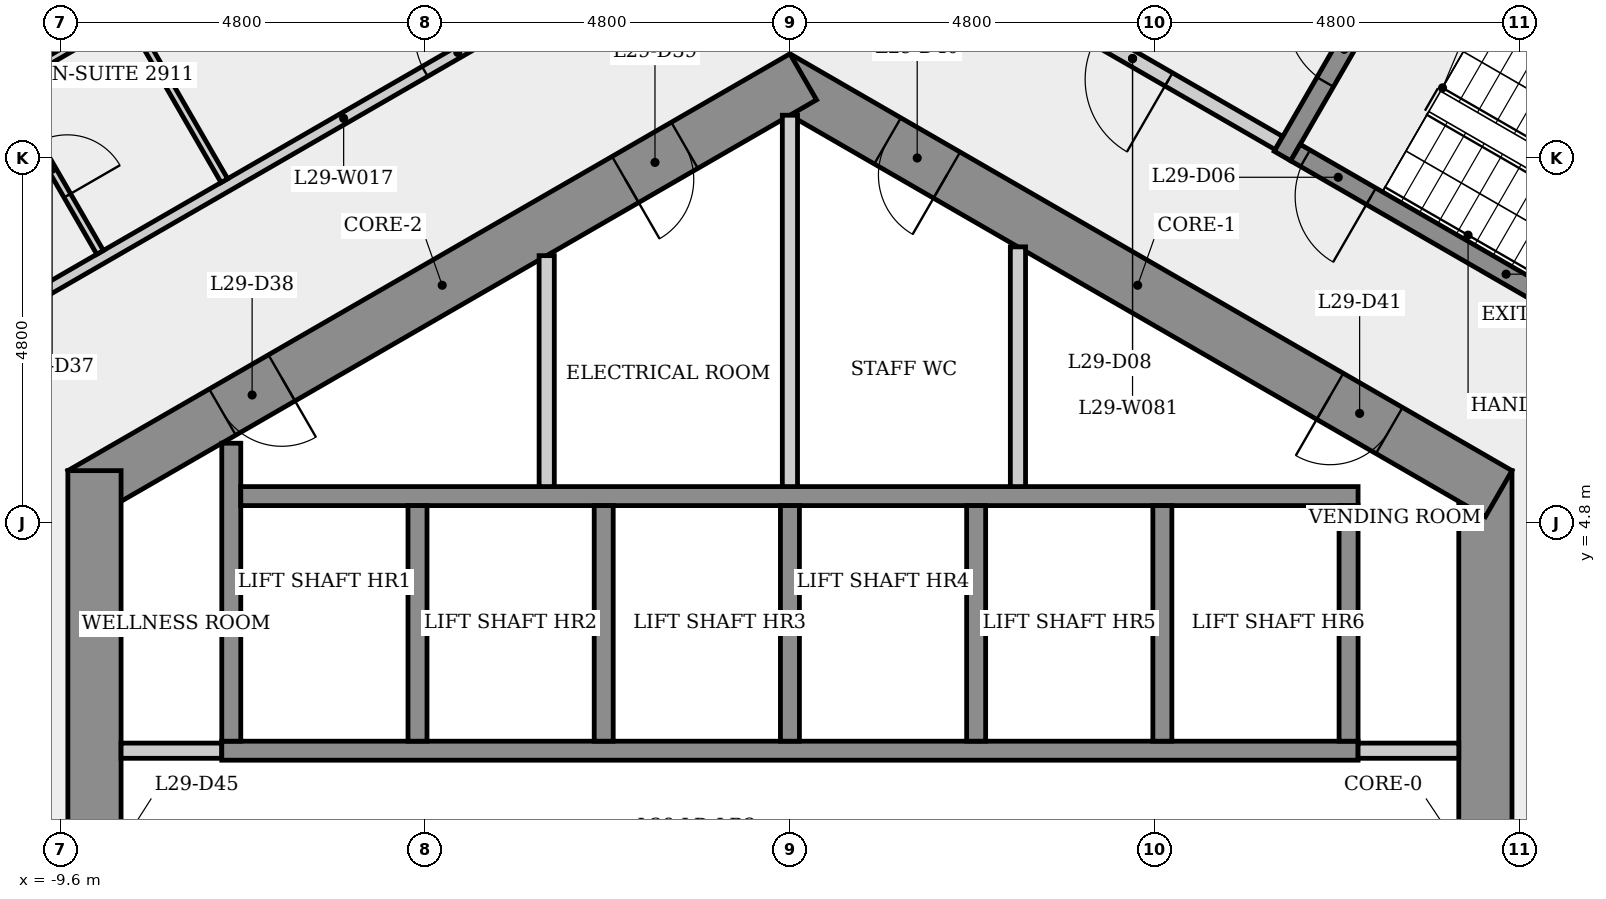
"""IFC4 building model, lengths in metres.
Left out: names, types, materials, properties, quantities, classifications, styles, units other than length and angle.
Written with IfcOpenShell. Run it as: python <this file> out.ifc"""

import sys

from ifc_helpers import new_model, si_unit, direction, frame, frame_2d, origin, place, context, subcontext, project, spatial, rectangle, extrude, element, fill, save


model = new_model("IFC4")
c1 = context("Model", 3, precision=1e-05, world=origin(), true_north=direction((0.0, 1.0)))
c2 = subcontext(c1, "Body", "Model", "MODEL_VIEW")
j1 = project(units=[si_unit("LENGTHUNIT", "METRE"), si_unit("PLANEANGLEUNIT", "RADIAN")], contexts=[c1])
p1 = place(None, origin())
s1 = spatial("IfcSite", under=j1, at=p1, CompositionType="ELEMENT")
p2 = place(p1, origin())
s2 = spatial("IfcBuilding", under=s1, at=p2, CompositionType="ELEMENT")
p3 = place(p2, frame((0.0, 0.0, 110.3)))
s3 = spatial("IfcBuildingStorey", under=s2, at=p3, CompositionType="ELEMENT", Elevation=110.3)
p4 = place(p3, frame((9.15, -5.485, 0.0), z_axis=(0.0, 0.0, 1.0), x_axis=(0.0, 1.0, 0.0)))
e1 = element("IfcWall", 1, at=p4, inside=s3, PredefinedType="SHEAR", context=c2, shape_type="SweptSolid", body=[
    extrude(rectangle(XDim=10.97, YDim=0.7, at=frame_2d((5.485, 0.0))), origin(), (0.0, 0.0, 1.0), 3.4),
])
p5 = place(p4, frame((4.685, 0.0, 0.0)))
e2 = element("IfcOpeningElement", 2, at=p5, cuts=e1, PredefinedType="OPENING", context=c2, shape_type="SweptSolid", body=[
    extrude(rectangle(XDim=1.6, YDim=2.1, at=frame_2d((0.8, 1.05))), frame((0.0, 0.36, 0.0), z_axis=(0.0, -1.0, 0.0), x_axis=(1.0, 0.0, 0.0)), (0.0, 0.0, 1.0), 0.72),
])
p6 = place(p3, frame((9.325, 5.182, 0.0), z_axis=(0.0, 0.0, 1.0), x_axis=(-0.866023993627, 0.500002442456, 0.0)))
e3 = element("IfcWall", 3, at=p6, inside=s3, PredefinedType="SHEAR", context=c2, shape_type="SweptSolid", body=[
    extrude(rectangle(XDim=10.97, YDim=0.7, at=frame_2d((5.485, 0.0))), origin(), (0.0, 0.0, 1.0), 3.4),
])
p7 = place(p6, frame((8.384, 0.0, 0.0)))
e4 = element("IfcOpeningElement", 4, at=p7, cuts=e3, PredefinedType="OPENING", context=c2, shape_type="SweptSolid", body=[
    extrude(rectangle(XDim=0.9, YDim=2.1, at=frame_2d((0.45, 1.05))), frame((0.0, 0.36, 0.0), z_axis=(0.0, -1.0, 0.0), x_axis=(1.0, 0.0, 0.0)), (0.0, 0.0, 1.0), 0.72),
])
p8 = place(p6, frame((1.663, 0.0, 0.0)))
e5 = element("IfcOpeningElement", 5, at=p8, cuts=e3, PredefinedType="OPENING", context=c2, shape_type="SweptSolid", body=[
    extrude(rectangle(XDim=0.9, YDim=2.1, at=frame_2d((0.45, 1.05))), frame((0.0, 0.36, 0.0), z_axis=(0.0, -1.0, 0.0), x_axis=(1.0, 0.0, 0.0)), (0.0, 0.0, 1.0), 0.72),
])
p9 = place(p3, frame((0.175, 10.667, 0.0), z_axis=(0.0, 0.0, 1.0), x_axis=(-0.866023993627, -0.500002442456, 0.0)))
e6 = element("IfcWall", 6, at=p9, inside=s3, PredefinedType="SHEAR", context=c2, shape_type="SweptSolid", body=[
    extrude(rectangle(XDim=10.97, YDim=0.7, at=frame_2d((5.485, 0.0))), origin(), (0.0, 0.0, 1.0), 3.4),
])
p10 = place(p9, frame((7.923, 0.0, 0.0)))
e7 = element("IfcOpeningElement", 7, at=p10, cuts=e6, PredefinedType="OPENING", context=c2, shape_type="SweptSolid", body=[
    extrude(rectangle(XDim=0.9, YDim=2.1, at=frame_2d((0.45, 1.05))), frame((0.0, 0.36, 0.0), z_axis=(0.0, -1.0, 0.0), x_axis=(1.0, 0.0, 0.0)), (0.0, 0.0, 1.0), 0.72),
])
p11 = place(p9, frame((1.802, 0.0, 0.0)))
e8 = element("IfcOpeningElement", 8, at=p11, cuts=e6, PredefinedType="OPENING", context=c2, shape_type="SweptSolid", body=[
    extrude(rectangle(XDim=0.9, YDim=2.1, at=frame_2d((0.45, 1.05))), frame((0.0, 0.36, 0.0), z_axis=(0.0, -1.0, 0.0), x_axis=(1.0, 0.0, 0.0)), (0.0, 0.0, 1.0), 0.72),
])
p12 = place(p3, frame((-9.15, 5.485, 0.0), z_axis=(0.0, 0.0, 1.0), x_axis=(0.0, -1.0, 0.0)))
e9 = element("IfcWall", 9, at=p12, inside=s3, PredefinedType="SHEAR", context=c2, shape_type="SweptSolid", body=[
    extrude(rectangle(XDim=10.97, YDim=0.7, at=frame_2d((5.485, 0.0))), origin(), (0.0, 0.0, 1.0), 3.4),
])
p13 = place(p12, frame((4.685, 0.0, 0.0)))
e10 = element("IfcOpeningElement", 10, at=p13, cuts=e9, PredefinedType="OPENING", context=c2, shape_type="SweptSolid", body=[
    extrude(rectangle(XDim=1.6, YDim=2.1, at=frame_2d((0.8, 1.05))), frame((0.0, 0.36, 0.0), z_axis=(0.0, -1.0, 0.0), x_axis=(1.0, 0.0, 0.0)), (0.0, 0.0, 1.0), 0.72),
])
p14 = place(p3, frame((-10.446, 7.479, 0.0), z_axis=(0.0, 0.0, 1.0), x_axis=(0.866020092673, 0.500009199002, 0.0)))
e11 = element("IfcWall", 11, at=p14, inside=s3, PredefinedType="PARTITIONING", context=c2, shape_type="SweptSolid", body=[
    extrude(rectangle(XDim=10.564, YDim=0.15, at=frame_2d((5.282, 0.0))), origin(), (0.0, 0.0, 1.0), 3.05),
])
p15 = place(p14, frame((6.516, 0.0, 0.0)))
e12 = element("IfcOpeningElement", 12, at=p15, cuts=e11, PredefinedType="OPENING", context=c2, shape_type="SweptSolid", body=[
    extrude(rectangle(XDim=1.0, YDim=2.1, at=frame_2d((0.5, 1.05))), frame((0.0, 0.085, 0.0), z_axis=(0.0, -1.0, 0.0), x_axis=(1.0, 0.0, 0.0)), (0.0, 0.0, 1.0), 0.17),
])
p16 = place(p3, frame((-10.364, 10.586, 0.0), z_axis=(0.0, 0.0, 1.0), x_axis=(0.499963209246, -0.866046643894, 0.0)))
e13 = element("IfcWall", 13, at=p16, inside=s3, PredefinedType="PARTITIONING", context=c2, shape_type="SweptSolid", body=[
    extrude(rectangle(XDim=2.575, YDim=0.1, at=frame_2d((1.288, 0.0))), origin(), (0.0, 0.0, 1.0), 3.05),
])
p17 = place(p16, frame((0.913, 0.0, 0.0)))
e14 = element("IfcOpeningElement", 14, at=p17, cuts=e13, PredefinedType="OPENING", context=c2, shape_type="SweptSolid", body=[
    extrude(rectangle(XDim=0.8, YDim=2.1, at=frame_2d((0.4, 1.05))), frame((0.0, 0.06, 0.0), z_axis=(0.0, -1.0, 0.0), x_axis=(1.0, 0.0, 0.0)), (0.0, 0.0, 1.0), 0.12),
])
p18 = place(p3, frame((-8.8, 1.8, 0.0), z_axis=(0.0, 0.0, 1.0), x_axis=(1.0, 0.0, 0.0)))
e15 = element("IfcWall", 15, at=p18, inside=s3, PredefinedType="PARTITIONING", context=c2, shape_type="SweptSolid", body=[
    extrude(rectangle(XDim=1.325, YDim=0.2, at=frame_2d((0.663, 0.0))), origin(), (0.0, 0.0, 1.0), 3.05),
])
p19 = place(p3, frame((-8.747, 11.462, 0.0), z_axis=(0.0, 0.0, 1.0), x_axis=(-0.866033252409, -0.499986405537, 0.0)))
e16 = element("IfcWall", 16, at=p19, inside=s3, PredefinedType="PARTITIONING", context=c2, shape_type="SweptSolid", body=[
    extrude(rectangle(XDim=1.788, YDim=0.1, at=frame_2d((0.894, 0.0))), origin(), (0.0, 0.0, 1.0), 3.05),
])
p20 = place(p3, frame((-11.296, 15.978, 0.0), z_axis=(0.0, 0.0, 1.0), x_axis=(0.499997453958, -0.866026873738, 0.0)))
e17 = element("IfcWall", 17, at=p20, inside=s3, PredefinedType="PARTITIONING", context=c2, shape_type="SweptSolid", body=[
    extrude(rectangle(XDim=7.71, YDim=0.1, at=frame_2d((3.855, 0.0))), origin(), (0.0, 0.0, 1.0), 3.05),
])
p21 = place(p3, frame((-7.475, 1.8, 0.0), z_axis=(0.0, 0.0, 1.0), x_axis=(1.0, 0.0, 0.0)))
e18 = element("IfcWall", 18, at=p21, inside=s3, PredefinedType="SHEAR", context=c2, shape_type="SweptSolid", body=[
    extrude(rectangle(XDim=14.95, YDim=0.25, at=frame_2d((7.475, 0.0))), origin(), (0.0, 0.0, 1.0), 3.05),
])
p22 = place(p3, frame((-7.35, 1.925, 0.0), z_axis=(0.0, 0.0, 1.0), x_axis=(0.0, 1.0, 0.0)))
e19 = element("IfcWall", 19, at=p22, inside=s3, PredefinedType="SHEAR", context=c2, shape_type="SweptSolid", body=[
    extrude(rectangle(XDim=3.921, YDim=0.25, at=frame_2d((1.96, 0.0))), origin(), (0.0, 0.0, 1.0), 3.05),
])
p23 = place(p3, frame((-7.225, 5.15, 0.0), z_axis=(0.0, 0.0, 1.0), x_axis=(1.0, 0.0, 0.0)))
e20 = element("IfcWall", 20, at=p23, inside=s3, PredefinedType="SHEAR", context=c2, shape_type="SweptSolid", body=[
    extrude(rectangle(XDim=14.7, YDim=0.25, at=frame_2d((7.35, 0.0))), origin(), (0.0, 0.0, 1.0), 3.05),
])
p24 = place(p3, frame((-4.9, 5.025, 0.0), z_axis=(0.0, 0.0, 1.0), x_axis=(0.0, -1.0, 0.0)))
e21 = element("IfcWall", 21, at=p24, inside=s3, PredefinedType="SHEAR", context=c2, shape_type="SweptSolid", body=[
    extrude(rectangle(XDim=3.1, YDim=0.25, at=frame_2d((1.55, 0.0))), origin(), (0.0, 0.0, 1.0), 3.4),
])
p25 = place(p3, frame((-3.2, 8.314, 0.0), z_axis=(0.0, 0.0, 1.0), x_axis=(0.0, -1.0, 0.0)))
e22 = element("IfcWall", 22, at=p25, inside=s3, PredefinedType="PARTITIONING", context=c2, shape_type="SweptSolid", body=[
    extrude(rectangle(XDim=3.039, YDim=0.2, at=frame_2d((1.52, 0.0))), origin(), (0.0, 0.0, 1.0), 3.05),
])
for number, where, z_axis, x_axis in (
    (23, (-2.45, 5.025, 0.0), (0.0, 0.0, 1.0), (0.0, -1.0, 0.0)),
    (24, (0.0, 5.025, 0.0), (0.0, 0.0, 1.0), (0.0, -1.0, 0.0)),
):
    element("IfcWall", number, at=place(p3, frame(where, z_axis=z_axis, x_axis=x_axis)), inside=s3, PredefinedType="SHEAR", context=c2, shape_type="SweptSolid", body=[
        extrude(rectangle(XDim=3.1, YDim=0.25, at=frame_2d((1.55, 0.0))), origin(), (0.0, 0.0, 1.0), 3.4),
    ])
p26 = place(p3, frame((0.0, 10.161, 0.0), z_axis=(0.0, 0.0, 1.0), x_axis=(0.0, -1.0, 0.0)))
e25 = element("IfcWall", 25, at=p26, inside=s3, PredefinedType="PARTITIONING", context=c2, shape_type="SweptSolid", body=[
    extrude(rectangle(XDim=4.886, YDim=0.2, at=frame_2d((2.443, 0.0))), origin(), (0.0, 0.0, 1.0), 3.05),
])
p27 = place(p3, frame((2.45, 5.025, 0.0), z_axis=(0.0, 0.0, 1.0), x_axis=(0.0, -1.0, 0.0)))
e26 = element("IfcWall", 26, at=p27, inside=s3, PredefinedType="SHEAR", context=c2, shape_type="SweptSolid", body=[
    extrude(rectangle(XDim=3.1, YDim=0.25, at=frame_2d((1.55, 0.0))), origin(), (0.0, 0.0, 1.0), 3.4),
])
p28 = place(p3, frame((3.0, 8.429, 0.0), z_axis=(0.0, 0.0, 1.0), x_axis=(0.0, -1.0, 0.0)))
e27 = element("IfcWall", 27, at=p28, inside=s3, PredefinedType="PARTITIONING", context=c2, shape_type="SweptSolid", body=[
    extrude(rectangle(XDim=3.154, YDim=0.2, at=frame_2d((1.577, 0.0))), origin(), (0.0, 0.0, 1.0), 3.05),
])
p29 = place(p3, frame((4.9, 5.025, 0.0), z_axis=(0.0, 0.0, 1.0), x_axis=(0.0, -1.0, 0.0)))
e28 = element("IfcWall", 28, at=p29, inside=s3, PredefinedType="SHEAR", context=c2, shape_type="SweptSolid", body=[
    extrude(rectangle(XDim=3.1, YDim=0.25, at=frame_2d((1.55, 0.0))), origin(), (0.0, 0.0, 1.0), 3.4),
])
p30 = place(p3, frame((6.435, 9.795, 0.0), z_axis=(0.0, 0.0, 1.0), x_axis=(-0.866012907634, 0.500021643343, 0.0)))
e29 = element("IfcWall", 29, at=p30, inside=s3, PredefinedType="PARTITIONING", context=c2, shape_type="SweptSolid", body=[
    extrude(rectangle(XDim=4.45, YDim=0.2, at=frame_2d((2.225, 0.0))), origin(), (0.0, 0.0, 1.0), 3.05),
])
p31 = place(p30, frame((1.675, 0.0, 0.0)))
e30 = element("IfcOpeningElement", 30, at=p31, cuts=e29, PredefinedType="OPENING", context=c2, shape_type="SweptSolid", body=[
    extrude(rectangle(XDim=1.1, YDim=2.1, at=frame_2d((0.55, 1.05))), frame((0.0, 0.11, 0.0), z_axis=(0.0, -1.0, 0.0), x_axis=(1.0, 0.0, 0.0)), (0.0, 0.0, 1.0), 0.22),
])
p32 = place(p3, frame((6.48, 9.624, 0.0), z_axis=(0.0, 0.0, 1.0), x_axis=(0.500017246033, 0.866015446554, 0.0)))
e31 = element("IfcWall", 31, at=p32, inside=s3, PredefinedType="SHEAR", context=c2, shape_type="SweptSolid", body=[
    extrude(rectangle(XDim=3.25, YDim=0.25, at=frame_2d((1.625, 0.0))), origin(), (0.0, 0.0, 1.0), 3.05),
])
p33 = place(p32, frame((1.125, 0.0, 0.0)))
e32 = element("IfcOpeningElement", 32, at=p33, cuts=e31, PredefinedType="OPENING", context=c2, shape_type="SweptSolid", body=[
    extrude(rectangle(XDim=1.0, YDim=2.1, at=frame_2d((0.5, 1.05))), frame((0.0, 0.135, 0.0), z_axis=(0.0, -1.0, 0.0), x_axis=(1.0, 0.0, 0.0)), (0.0, 0.0, 1.0), 0.27),
])
p34 = place(p3, frame((7.475, 1.8, 0.0), z_axis=(0.0, 0.0, 1.0), x_axis=(1.0, 0.0, 0.0)))
e33 = element("IfcWall", 33, at=p34, inside=s3, PredefinedType="PARTITIONING", context=c2, shape_type="SweptSolid", body=[
    extrude(rectangle(XDim=1.325, YDim=0.2, at=frame_2d((0.663, 0.0))), origin(), (0.0, 0.0, 1.0), 3.05),
])
p35 = place(p3, frame((7.35, 5.025, 0.0), z_axis=(0.0, 0.0, 1.0), x_axis=(0.0, -1.0, 0.0)))
e34 = element("IfcWall", 34, at=p35, inside=s3, PredefinedType="SHEAR", context=c2, shape_type="SweptSolid", body=[
    extrude(rectangle(XDim=3.1, YDim=0.25, at=frame_2d((1.55, 0.0))), origin(), (0.0, 0.0, 1.0), 3.4),
])
p36 = place(p3, frame((8.151, 12.268, 0.0), z_axis=(0.0, 0.0, 1.0), x_axis=(0.866025499775, -0.499999833739, 0.0)))
e35 = element("IfcWall", 35, at=p36, inside=s3, PredefinedType="SHEAR", context=c2, shape_type="SweptSolid", body=[
    extrude(rectangle(XDim=6.4, YDim=0.25, at=frame_2d((3.2, 0.0))), origin(), (0.0, 0.0, 1.0), 3.05),
])
p37 = place(p3, frame((12.194, 6.47, 0.0), z_axis=(0.0, 0.0, 1.0), x_axis=(-0.866025499775, 0.499999833739, 0.0)))
e36 = element("IfcWall", 36, at=p37, inside=s3, PredefinedType="SHEAR", context=c2, shape_type="SweptSolid", body=[
    extrude(rectangle(XDim=6.4, YDim=0.25, at=frame_2d((3.2, 0.0))), origin(), (0.0, 0.0, 1.0), 3.05),
])
p38 = place(p37, frame((5.25, 0.0, 0.0)))
e37 = element("IfcOpeningElement", 37, at=p38, cuts=e36, PredefinedType="OPENING", context=c2, shape_type="SweptSolid", body=[
    extrude(rectangle(XDim=1.0, YDim=2.1, at=frame_2d((0.5, 1.05))), frame((0.0, 0.135, 0.0), z_axis=(0.0, -1.0, 0.0), x_axis=(1.0, 0.0, 0.0)), (0.0, 0.0, 1.0), 0.27),
])
p39 = place(p38, origin())
e38 = element("IfcDoor", 38, at=p39, inside=s3, OperationType="SINGLE_SWING_LEFT", PredefinedType="DOOR", context=c2, shape_type="SweptSolid", body=[
    extrude(rectangle(XDim=1.0, YDim=2.1, at=frame_2d((0.5, 1.05))), frame((0.0, 0.025, 0.0), z_axis=(0.0, -1.0, 0.0), x_axis=(1.0, 0.0, 0.0)), (0.0, 0.0, 1.0), 0.05),
])
fill(e37, e38)
p40 = place(p33, origin())
e39 = element("IfcDoor", 39, at=p40, inside=s3, OperationType="SINGLE_SWING_RIGHT", PredefinedType="DOOR", context=c2, shape_type="SweptSolid", body=[
    extrude(rectangle(XDim=1.0, YDim=2.1, at=frame_2d((0.5, 1.05))), frame((0.0, 0.025, 0.0), z_axis=(0.0, -1.0, 0.0), x_axis=(1.0, 0.0, 0.0)), (0.0, 0.0, 1.0), 0.05),
])
fill(e32, e39)
p41 = place(p31, origin())
e40 = element("IfcDoor", 40, at=p41, inside=s3, OperationType="SINGLE_SWING_LEFT", PredefinedType="DOOR", context=c2, shape_type="SweptSolid", body=[
    extrude(rectangle(XDim=1.1, YDim=2.1, at=frame_2d((0.55, 1.05))), frame((0.0, 0.025, 0.0), z_axis=(0.0, -1.0, 0.0), x_axis=(1.0, 0.0, 0.0)), (0.0, 0.0, 1.0), 0.05),
])
fill(e30, e40)
p42 = place(p15, origin())
e41 = element("IfcDoor", 41, at=p42, inside=s3, OperationType="SINGLE_SWING_RIGHT", PredefinedType="DOOR", context=c2, shape_type="SweptSolid", body=[
    extrude(rectangle(XDim=1.0, YDim=2.1, at=frame_2d((0.5, 1.05))), frame((0.0, 0.025, 0.0), z_axis=(0.0, -1.0, 0.0), x_axis=(1.0, 0.0, 0.0)), (0.0, 0.0, 1.0), 0.05),
])
fill(e12, e41)
p43 = place(p17, origin())
e42 = element("IfcDoor", 42, at=p43, inside=s3, OperationType="SINGLE_SWING_RIGHT", PredefinedType="DOOR", context=c2, shape_type="SweptSolid", body=[
    extrude(rectangle(XDim=0.8, YDim=2.1, at=frame_2d((0.4, 1.05))), frame((0.0, 0.025, 0.0), z_axis=(0.0, -1.0, 0.0), x_axis=(1.0, 0.0, 0.0)), (0.0, 0.0, 1.0), 0.05),
])
fill(e14, e42)
p44 = place(p10, origin())
e43 = element("IfcDoor", 43, at=p44, inside=s3, OperationType="SINGLE_SWING_LEFT", PredefinedType="DOOR", context=c2, shape_type="SweptSolid", body=[
    extrude(rectangle(XDim=0.9, YDim=2.1, at=frame_2d((0.45, 1.05))), frame((0.0, 0.025, 0.0), z_axis=(0.0, -1.0, 0.0), x_axis=(1.0, 0.0, 0.0)), (0.0, 0.0, 1.0), 0.05),
])
fill(e7, e43)
p45 = place(p11, origin())
e44 = element("IfcDoor", 44, at=p45, inside=s3, OperationType="SINGLE_SWING_RIGHT", PredefinedType="DOOR", context=c2, shape_type="SweptSolid", body=[
    extrude(rectangle(XDim=0.9, YDim=2.1, at=frame_2d((0.45, 1.05))), frame((0.0, 0.025, 0.0), z_axis=(0.0, -1.0, 0.0), x_axis=(1.0, 0.0, 0.0)), (0.0, 0.0, 1.0), 0.05),
])
fill(e8, e44)
p46 = place(p7, origin())
e45 = element("IfcDoor", 45, at=p46, inside=s3, OperationType="SINGLE_SWING_LEFT", PredefinedType="DOOR", context=c2, shape_type="SweptSolid", body=[
    extrude(rectangle(XDim=0.9, YDim=2.1, at=frame_2d((0.45, 1.05))), frame((0.0, 0.025, 0.0), z_axis=(0.0, -1.0, 0.0), x_axis=(1.0, 0.0, 0.0)), (0.0, 0.0, 1.0), 0.05),
])
fill(e4, e45)
p47 = place(p8, origin())
e46 = element("IfcDoor", 46, at=p47, inside=s3, OperationType="SINGLE_SWING_RIGHT", PredefinedType="DOOR", context=c2, shape_type="SweptSolid", body=[
    extrude(rectangle(XDim=0.9, YDim=2.1, at=frame_2d((0.45, 1.05))), frame((0.0, 0.025, 0.0), z_axis=(0.0, -1.0, 0.0), x_axis=(1.0, 0.0, 0.0)), (0.0, 0.0, 1.0), 0.05),
])
fill(e5, e46)
save(model, sys.argv[1])
